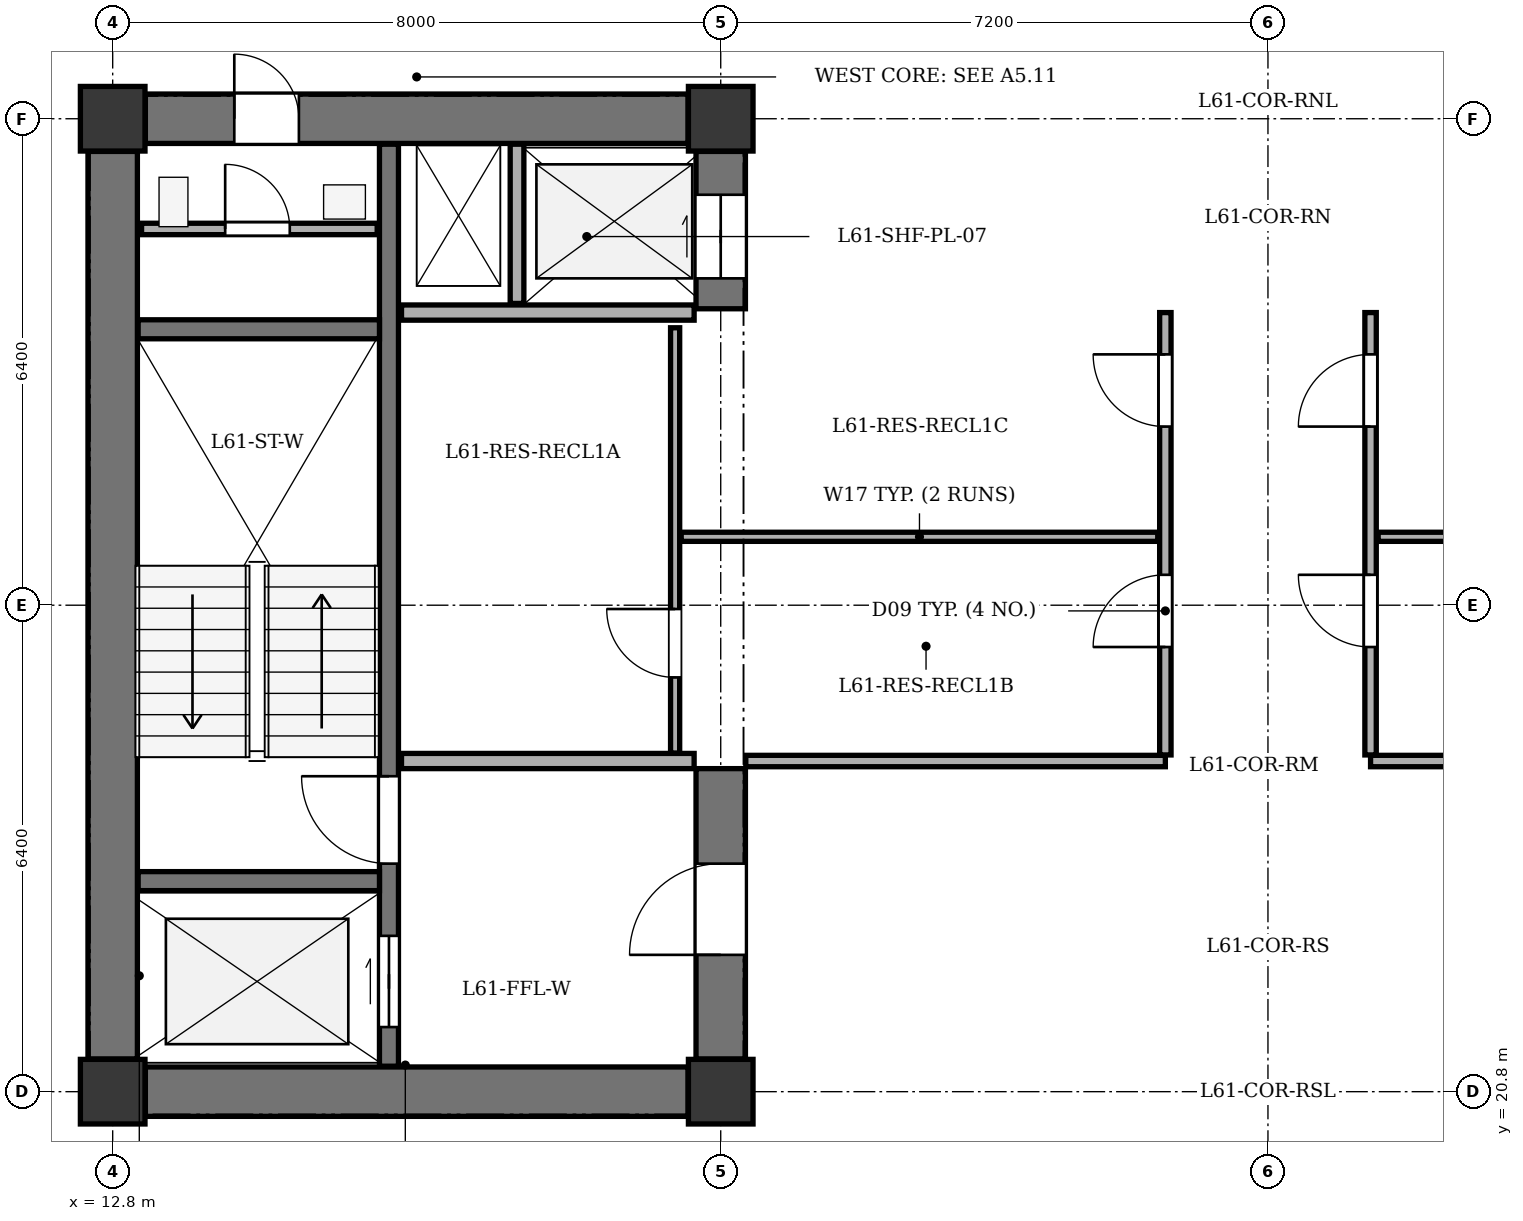
"""IFC4 building model, lengths in metres.
Left out: names, types, materials, properties, quantities, classifications, styles, units other than length and angle.
Written with IfcOpenShell. Run it as: python <this file> out.ifc"""

import sys

from ifc_helpers import new_model, si_unit, direction, frame, frame_2d, origin, origin_2d, place, context, subcontext, project, spatial, rectangle, extrude, element, fill, save


model = new_model("IFC4")
c1 = context("Model", 3, precision=1e-05, world=origin(), true_north=direction((0.0, 1.0)))
c2 = subcontext(c1, "Body", "Model", "MODEL_VIEW")
j1 = project(units=[si_unit("LENGTHUNIT", "METRE"), si_unit("PLANEANGLEUNIT", "RADIAN")], contexts=[c1])
p1 = place(None, origin())
s1 = spatial("IfcSite", under=j1, at=p1, CompositionType="ELEMENT")
p2 = place(p1, origin())
s2 = spatial("IfcBuilding", under=s1, at=p2, CompositionType="ELEMENT")
p3 = place(p2, frame((0.0, 0.0, 234.7)))
s3 = spatial("IfcBuildingStorey", under=s2, at=p3, CompositionType="ELEMENT", Elevation=234.7)
for number, where, z_axis, x_axis in (
    (1, (12.8, 20.8, 0.0), (0.0, 0.0, 1.0), (1.0, 0.0, 0.0)),
    (2, (20.8, 20.8, 0.0), (0.0, 0.0, 1.0), (1.0, 0.0, 0.0)),
    (3, (12.8, 33.6, 0.0), (0.0, 0.0, 1.0), (1.0, 0.0, 0.0)),
    (4, (20.8, 33.6, 0.0), (0.0, 0.0, 1.0), (1.0, 0.0, 0.0)),
):
    element("IfcColumn", number, at=place(p3, frame(where, z_axis=z_axis, x_axis=x_axis)), inside=s3, PredefinedType="COLUMN", context=c2, shape_type="SweptSolid", body=[
        extrude(rectangle(XDim=0.85, YDim=0.85, at=origin_2d()), origin(), (0.0, 0.0, 1.0), 3.4),
    ])
p4 = place(p3, frame((12.8, 21.23, 0.0), z_axis=(0.0, 0.0, 1.0), x_axis=(0.0, 1.0, 0.0)))
e5 = element("IfcWall", 5, at=p4, inside=s3, PredefinedType="SHEAR", context=c2, shape_type="SweptSolid", body=[
    extrude(rectangle(XDim=11.94, YDim=0.65, at=frame_2d((5.97, 0.0))), origin(), (0.0, 0.0, 1.0), 3.1),
])
p5 = place(p3, frame((13.23, 20.8, 0.0), z_axis=(0.0, 0.0, 1.0), x_axis=(1.0, 0.0, 0.0)))
e6 = element("IfcWall", 6, at=p5, inside=s3, PredefinedType="SHEAR", context=c2, shape_type="SweptSolid", body=[
    extrude(rectangle(XDim=7.14, YDim=0.65, at=frame_2d((3.57, 0.0))), origin(), (0.0, 0.0, 1.0), 3.1),
])
p6 = place(p3, frame((13.23, 33.6, 0.0), z_axis=(0.0, 0.0, 1.0), x_axis=(1.0, 0.0, 0.0)))
e7 = element("IfcWall", 7, at=p6, inside=s3, PredefinedType="SHEAR", context=c2, shape_type="SweptSolid", body=[
    extrude(rectangle(XDim=7.14, YDim=0.65, at=frame_2d((3.57, 0.0))), origin(), (0.0, 0.0, 1.0), 3.1),
])
p7 = place(p6, frame((1.17, 0.0, 0.0)))
e8 = element("IfcOpeningElement", 8, at=p7, cuts=e7, PredefinedType="OPENING", context=c2, shape_type="SweptSolid", body=[
    extrude(rectangle(XDim=0.85, YDim=2.02, at=frame_2d((0.425, 1.01))), frame((0.0, 0.335, 0.0), z_axis=(0.0, -1.0, 0.0), x_axis=(1.0, 0.0, 0.0)), (0.0, 0.0, 1.0), 0.67),
])
p8 = place(p3, frame((20.8, 21.23, 0.0), z_axis=(0.0, 0.0, 1.0), x_axis=(0.0, 1.0, 0.0)))
e9 = element("IfcWall", 9, at=p8, inside=s3, PredefinedType="SHEAR", context=c2, shape_type="SweptSolid", body=[
    extrude(rectangle(XDim=3.82, YDim=0.65, at=frame_2d((1.91, 0.0))), origin(), (0.0, 0.0, 1.0), 3.1),
])
p9 = place(p8, frame((1.37, 0.0, 0.0)))
e10 = element("IfcOpeningElement", 10, at=p9, cuts=e9, PredefinedType="OPENING", context=c2, shape_type="SweptSolid", body=[
    extrude(rectangle(XDim=1.2, YDim=2.15, at=frame_2d((0.6, 1.075))), frame((0.0, 0.335, 0.0), z_axis=(0.0, -1.0, 0.0), x_axis=(1.0, 0.0, 0.0)), (0.0, 0.0, 1.0), 0.67),
])
p10 = place(p3, frame((20.8, 31.1, 0.0), z_axis=(0.0, 0.0, 1.0), x_axis=(0.0, 1.0, 0.0)))
e11 = element("IfcWall", 11, at=p10, inside=s3, PredefinedType="SHEAR", context=c2, shape_type="SweptSolid", body=[
    extrude(rectangle(XDim=2.07, YDim=0.65, at=frame_2d((1.035, 0.0))), origin(), (0.0, 0.0, 1.0), 3.1),
])
p11 = place(p10, frame((0.4, 0.0, 0.0)))
e12 = element("IfcOpeningElement", 12, at=p11, cuts=e11, PredefinedType="OPENING", context=c2, shape_type="SweptSolid", body=[
    extrude(rectangle(XDim=1.1, YDim=2.1, at=frame_2d((0.55, 1.05))), frame((0.0, 0.335, 0.0), z_axis=(0.0, -1.0, 0.0), x_axis=(1.0, 0.0, 0.0)), (0.0, 0.0, 1.0), 0.67),
])
p12 = place(p3, frame((16.435, 21.135, 0.0), z_axis=(0.0, 0.0, 1.0), x_axis=(0.0, 1.0, 0.0)))
e13 = element("IfcWall", 13, at=p12, inside=s3, PredefinedType="SHEAR", context=c2, shape_type="SweptSolid", body=[
    extrude(rectangle(XDim=12.13, YDim=0.25, at=frame_2d((6.065, 0.0))), origin(), (0.0, 0.0, 1.0), 3.1),
])
p13 = place(p12, frame((0.515, 0.0, 0.0)))
e14 = element("IfcOpeningElement", 14, at=p13, cuts=e13, PredefinedType="OPENING", context=c2, shape_type="SweptSolid", body=[
    extrude(rectangle(XDim=1.2, YDim=2.15, at=frame_2d((0.6, 1.075))), frame((0.0, 0.135, 0.0), z_axis=(0.0, -1.0, 0.0), x_axis=(1.0, 0.0, 0.0)), (0.0, 0.0, 1.0), 0.27),
])
p14 = place(p12, frame((2.665, 0.0, 0.0)))
e15 = element("IfcOpeningElement", 15, at=p14, cuts=e13, PredefinedType="OPENING", context=c2, shape_type="SweptSolid", body=[
    extrude(rectangle(XDim=1.15, YDim=2.15, at=frame_2d((0.575, 1.075))), frame((0.0, 0.135, 0.0), z_axis=(0.0, -1.0, 0.0), x_axis=(1.0, 0.0, 0.0)), (0.0, 0.0, 1.0), 0.27),
])
for number, where, z_axis, x_axis in (
    (16, (13.135, 23.57, 0.0), (0.0, 0.0, 1.0), (1.0, 0.0, 0.0)),
    (17, (13.135, 30.83, 0.0), (0.0, 0.0, 1.0), (1.0, 0.0, 0.0)),
):
    element("IfcWall", number, at=place(p3, frame(where, z_axis=z_axis, x_axis=x_axis)), inside=s3, PredefinedType="SHEAR", context=c2, shape_type="SweptSolid", body=[
        extrude(rectangle(XDim=3.175, YDim=0.25, at=frame_2d((1.587, 0.0))), origin(), (0.0, 0.0, 1.0), 3.1),
    ])
for number, where, z_axis, x_axis in (
    (18, (16.6, 25.15, 0.0), (0.0, 0.0, 1.0), (1.0, 0.0, 0.0)),
    (19, (16.6, 31.05, 0.0), (0.0, 0.0, 1.0), (1.0, 0.0, 0.0)),
):
    element("IfcWall", number, at=place(p3, frame(where, z_axis=z_axis, x_axis=x_axis)), inside=s3, PredefinedType="SOLIDWALL", context=c2, shape_type="SweptSolid", body=[
        extrude(rectangle(XDim=3.85, YDim=0.2, at=frame_2d((1.925, 0.0))), origin(), (0.0, 0.0, 1.0), 3.1),
    ])
p15 = place(p3, frame((18.12, 31.17, 0.0), z_axis=(0.0, 0.0, 1.0), x_axis=(0.0, 1.0, 0.0)))
e20 = element("IfcWall", 20, at=p15, inside=s3, PredefinedType="PARTITIONING", context=c2, shape_type="SweptSolid", body=[
    extrude(rectangle(XDim=2.095, YDim=0.18, at=frame_2d((1.047, 0.0))), origin(), (0.0, 0.0, 1.0), 3.1),
])
p16 = place(p3, frame((13.18, 32.15, 0.0), z_axis=(0.0, 0.0, 1.0), x_axis=(1.0, 0.0, 0.0)))
e21 = element("IfcWall", 21, at=p16, inside=s3, PredefinedType="PARTITIONING", context=c2, shape_type="SweptSolid", body=[
    extrude(rectangle(XDim=3.1, YDim=0.15, at=frame_2d((1.55, 0.0))), origin(), (0.0, 0.0, 1.0), 3.1),
])
p17 = place(p16, frame((1.1, 0.0, 0.0)))
e22 = element("IfcOpeningElement", 22, at=p17, cuts=e21, PredefinedType="OPENING", context=c2, shape_type="SweptSolid", body=[
    extrude(rectangle(XDim=0.85, YDim=2.02, at=frame_2d((0.425, 1.01))), frame((0.0, 0.085, 0.0), z_axis=(0.0, -1.0, 0.0), x_axis=(1.0, 0.0, 0.0)), (0.0, 0.0, 1.0), 0.17),
])
for number, where, z_axis, x_axis in (
    (23, (21.13, 25.15, 0.0), (0.0, 0.0, 1.0), (1.0, 0.0, 0.0)),
    (24, (29.35, 25.15, 0.0), (0.0, 0.0, 1.0), (1.0, 0.0, 0.0)),
):
    element("IfcWall", number, at=place(p3, frame(where, z_axis=z_axis, x_axis=x_axis)), inside=s3, PredefinedType="PARTITIONING", context=c2, shape_type="SweptSolid", body=[
        extrude(rectangle(XDim=5.52, YDim=0.15, at=frame_2d((2.76, 0.0))), origin(), (0.0, 0.0, 1.0), 3.1),
    ])
p18 = place(p3, frame((26.65, 25.23, 0.0), z_axis=(0.0, 0.0, 1.0), x_axis=(0.0, 1.0, 0.0)))
e25 = element("IfcWall", 25, at=p18, inside=s3, PredefinedType="PARTITIONING", context=c2, shape_type="SweptSolid", body=[
    extrude(rectangle(XDim=5.82, YDim=0.15, at=frame_2d((2.91, 0.0))), origin(), (0.0, 0.0, 1.0), 3.1),
])
p19 = place(p18, frame((1.42, 0.0, 0.0)))
e26 = element("IfcOpeningElement", 26, at=p19, cuts=e25, PredefinedType="OPENING", context=c2, shape_type="SweptSolid", body=[
    extrude(rectangle(XDim=0.95, YDim=2.1, at=frame_2d((0.475, 1.05))), frame((0.0, 0.085, 0.0), z_axis=(0.0, -1.0, 0.0), x_axis=(1.0, 0.0, 0.0)), (0.0, 0.0, 1.0), 0.17),
])
p20 = place(p18, frame((4.32, 0.0, 0.0)))
e27 = element("IfcOpeningElement", 27, at=p20, cuts=e25, PredefinedType="OPENING", context=c2, shape_type="SweptSolid", body=[
    extrude(rectangle(XDim=0.95, YDim=2.1, at=frame_2d((0.475, 1.05))), frame((0.0, 0.085, 0.0), z_axis=(0.0, -1.0, 0.0), x_axis=(1.0, 0.0, 0.0)), (0.0, 0.0, 1.0), 0.17),
])
p21 = place(p3, frame((20.2, 25.255, 0.0), z_axis=(0.0, 0.0, 1.0), x_axis=(0.0, 1.0, 0.0)))
e28 = element("IfcWall", 28, at=p21, inside=s3, PredefinedType="PARTITIONING", context=c2, shape_type="SweptSolid", body=[
    extrude(rectangle(XDim=5.595, YDim=0.12, at=frame_2d((2.798, 0.0))), origin(), (0.0, 0.0, 1.0), 3.1),
])
p22 = place(p21, frame((0.995, 0.0, 0.0)))
e29 = element("IfcOpeningElement", 29, at=p22, cuts=e28, PredefinedType="OPENING", context=c2, shape_type="SweptSolid", body=[
    extrude(rectangle(XDim=0.9, YDim=2.05, at=frame_2d((0.45, 1.025))), frame((0.0, 0.07, 0.0), z_axis=(0.0, -1.0, 0.0), x_axis=(1.0, 0.0, 0.0)), (0.0, 0.0, 1.0), 0.14),
])
p23 = place(p3, frame((20.28, 28.1, 0.0), z_axis=(0.0, 0.0, 1.0), x_axis=(1.0, 0.0, 0.0)))
e30 = element("IfcWall", 30, at=p23, inside=s3, PredefinedType="PARTITIONING", context=c2, shape_type="SweptSolid", body=[
    extrude(rectangle(XDim=6.27, YDim=0.12, at=frame_2d((3.135, 0.0))), origin(), (0.0, 0.0, 1.0), 3.1),
])
p24 = place(p3, frame((29.35, 25.23, 0.0), z_axis=(0.0, 0.0, 1.0), x_axis=(0.0, 1.0, 0.0)))
e31 = element("IfcWall", 31, at=p24, inside=s3, PredefinedType="PARTITIONING", context=c2, shape_type="SweptSolid", body=[
    extrude(rectangle(XDim=5.82, YDim=0.15, at=frame_2d((2.91, 0.0))), origin(), (0.0, 0.0, 1.0), 3.1),
])
p25 = place(p24, frame((1.42, 0.0, 0.0)))
e32 = element("IfcOpeningElement", 32, at=p25, cuts=e31, PredefinedType="OPENING", context=c2, shape_type="SweptSolid", body=[
    extrude(rectangle(XDim=0.95, YDim=2.1, at=frame_2d((0.475, 1.05))), frame((0.0, 0.085, 0.0), z_axis=(0.0, -1.0, 0.0), x_axis=(1.0, 0.0, 0.0)), (0.0, 0.0, 1.0), 0.17),
])
p26 = place(p24, frame((4.32, 0.0, 0.0)))
e33 = element("IfcOpeningElement", 33, at=p26, cuts=e31, PredefinedType="OPENING", context=c2, shape_type="SweptSolid", body=[
    extrude(rectangle(XDim=0.95, YDim=2.1, at=frame_2d((0.475, 1.05))), frame((0.0, 0.085, 0.0), z_axis=(0.0, -1.0, 0.0), x_axis=(1.0, 0.0, 0.0)), (0.0, 0.0, 1.0), 0.17),
])
p27 = place(p3, frame((29.45, 28.1, 0.0), z_axis=(0.0, 0.0, 1.0), x_axis=(1.0, 0.0, 0.0)))
e34 = element("IfcWall", 34, at=p27, inside=s3, PredefinedType="PARTITIONING", context=c2, shape_type="SweptSolid", body=[
    extrude(rectangle(XDim=5.27, YDim=0.12, at=frame_2d((2.635, 0.0))), origin(), (0.0, 0.0, 1.0), 3.1),
])
p28 = place(p7, origin())
e35 = element("IfcDoor", 35, at=p28, inside=s3, OperationType="SINGLE_SWING_LEFT", PredefinedType="DOOR", context=c2, shape_type="SweptSolid", body=[
    extrude(rectangle(XDim=0.85, YDim=2.02, at=frame_2d((0.425, 1.01))), frame((0.0, 0.025, 0.0), z_axis=(0.0, -1.0, 0.0), x_axis=(1.0, 0.0, 0.0)), (0.0, 0.0, 1.0), 0.05),
])
fill(e8, e35)
p29 = place(p9, origin())
e36 = element("IfcDoor", 36, at=p29, inside=s3, OperationType="SINGLE_SWING_LEFT", PredefinedType="DOOR", context=c2, shape_type="SweptSolid", body=[
    extrude(rectangle(XDim=1.2, YDim=2.15, at=frame_2d((0.6, 1.075))), frame((0.0, 0.025, 0.0), z_axis=(0.0, -1.0, 0.0), x_axis=(1.0, 0.0, 0.0)), (0.0, 0.0, 1.0), 0.05),
])
fill(e10, e36)
p30 = place(p11, origin())
e37 = element("IfcDoor", 37, at=p30, inside=s3, OperationType="DOUBLE_DOOR_SLIDING", PredefinedType="DOOR", context=c2, shape_type="SweptSolid", body=[
    extrude(rectangle(XDim=1.1, YDim=2.1, at=frame_2d((0.55, 1.05))), frame((0.0, 0.025, 0.0), z_axis=(0.0, -1.0, 0.0), x_axis=(1.0, 0.0, 0.0)), (0.0, 0.0, 1.0), 0.05),
])
fill(e12, e37)
p31 = place(p13, origin())
e38 = element("IfcDoor", 38, at=p31, inside=s3, OperationType="DOUBLE_DOOR_SLIDING", PredefinedType="DOOR", context=c2, shape_type="SweptSolid", body=[
    extrude(rectangle(XDim=1.2, YDim=2.15, at=frame_2d((0.6, 1.075))), frame((0.0, 0.025, 0.0), z_axis=(0.0, -1.0, 0.0), x_axis=(1.0, 0.0, 0.0)), (0.0, 0.0, 1.0), 0.05),
])
fill(e14, e38)
p32 = place(p14, origin())
e39 = element("IfcDoor", 39, at=p32, inside=s3, OperationType="SINGLE_SWING_RIGHT", PredefinedType="DOOR", context=c2, shape_type="SweptSolid", body=[
    extrude(rectangle(XDim=1.15, YDim=2.15, at=frame_2d((0.575, 1.075))), frame((0.0, 0.025, 0.0), z_axis=(0.0, -1.0, 0.0), x_axis=(1.0, 0.0, 0.0)), (0.0, 0.0, 1.0), 0.05),
])
fill(e15, e39)
p33 = place(p17, origin())
e40 = element("IfcDoor", 40, at=p33, inside=s3, OperationType="SINGLE_SWING_LEFT", PredefinedType="DOOR", context=c2, shape_type="SweptSolid", body=[
    extrude(rectangle(XDim=0.85, YDim=2.02, at=frame_2d((0.425, 1.01))), frame((0.0, 0.025, 0.0), z_axis=(0.0, -1.0, 0.0), x_axis=(1.0, 0.0, 0.0)), (0.0, 0.0, 1.0), 0.05),
])
fill(e22, e40)
p34 = place(p22, origin())
e41 = element("IfcDoor", 41, at=p34, inside=s3, OperationType="SINGLE_SWING_RIGHT", PredefinedType="DOOR", context=c2, shape_type="SweptSolid", body=[
    extrude(rectangle(XDim=0.9, YDim=2.05, at=frame_2d((0.45, 1.025))), frame((0.0, 0.025, 0.0), z_axis=(0.0, -1.0, 0.0), x_axis=(1.0, 0.0, 0.0)), (0.0, 0.0, 1.0), 0.05),
])
fill(e29, e41)
p35 = place(p19, origin())
e42 = element("IfcDoor", 42, at=p35, inside=s3, OperationType="SINGLE_SWING_LEFT", PredefinedType="DOOR", context=c2, shape_type="SweptSolid", body=[
    extrude(rectangle(XDim=0.95, YDim=2.1, at=frame_2d((0.475, 1.05))), frame((0.0, 0.025, 0.0), z_axis=(0.0, -1.0, 0.0), x_axis=(1.0, 0.0, 0.0)), (0.0, 0.0, 1.0), 0.05),
])
fill(e26, e42)
p36 = place(p20, origin())
e43 = element("IfcDoor", 43, at=p36, inside=s3, OperationType="SINGLE_SWING_RIGHT", PredefinedType="DOOR", context=c2, shape_type="SweptSolid", body=[
    extrude(rectangle(XDim=0.95, YDim=2.1, at=frame_2d((0.475, 1.05))), frame((0.0, 0.025, 0.0), z_axis=(0.0, -1.0, 0.0), x_axis=(1.0, 0.0, 0.0)), (0.0, 0.0, 1.0), 0.05),
])
fill(e27, e43)
p37 = place(p25, origin())
e44 = element("IfcDoor", 44, at=p37, inside=s3, OperationType="SINGLE_SWING_RIGHT", PredefinedType="DOOR", context=c2, shape_type="SweptSolid", body=[
    extrude(rectangle(XDim=0.95, YDim=2.1, at=frame_2d((0.475, 1.05))), frame((0.0, 0.025, 0.0), z_axis=(0.0, -1.0, 0.0), x_axis=(1.0, 0.0, 0.0)), (0.0, 0.0, 1.0), 0.05),
])
fill(e32, e44)
p38 = place(p26, origin())
e45 = element("IfcDoor", 45, at=p38, inside=s3, OperationType="SINGLE_SWING_LEFT", PredefinedType="DOOR", context=c2, shape_type="SweptSolid", body=[
    extrude(rectangle(XDim=0.95, YDim=2.1, at=frame_2d((0.475, 1.05))), frame((0.0, 0.025, 0.0), z_axis=(0.0, -1.0, 0.0), x_axis=(1.0, 0.0, 0.0)), (0.0, 0.0, 1.0), 0.05),
])
fill(e33, e45)
save(model, sys.argv[1])
